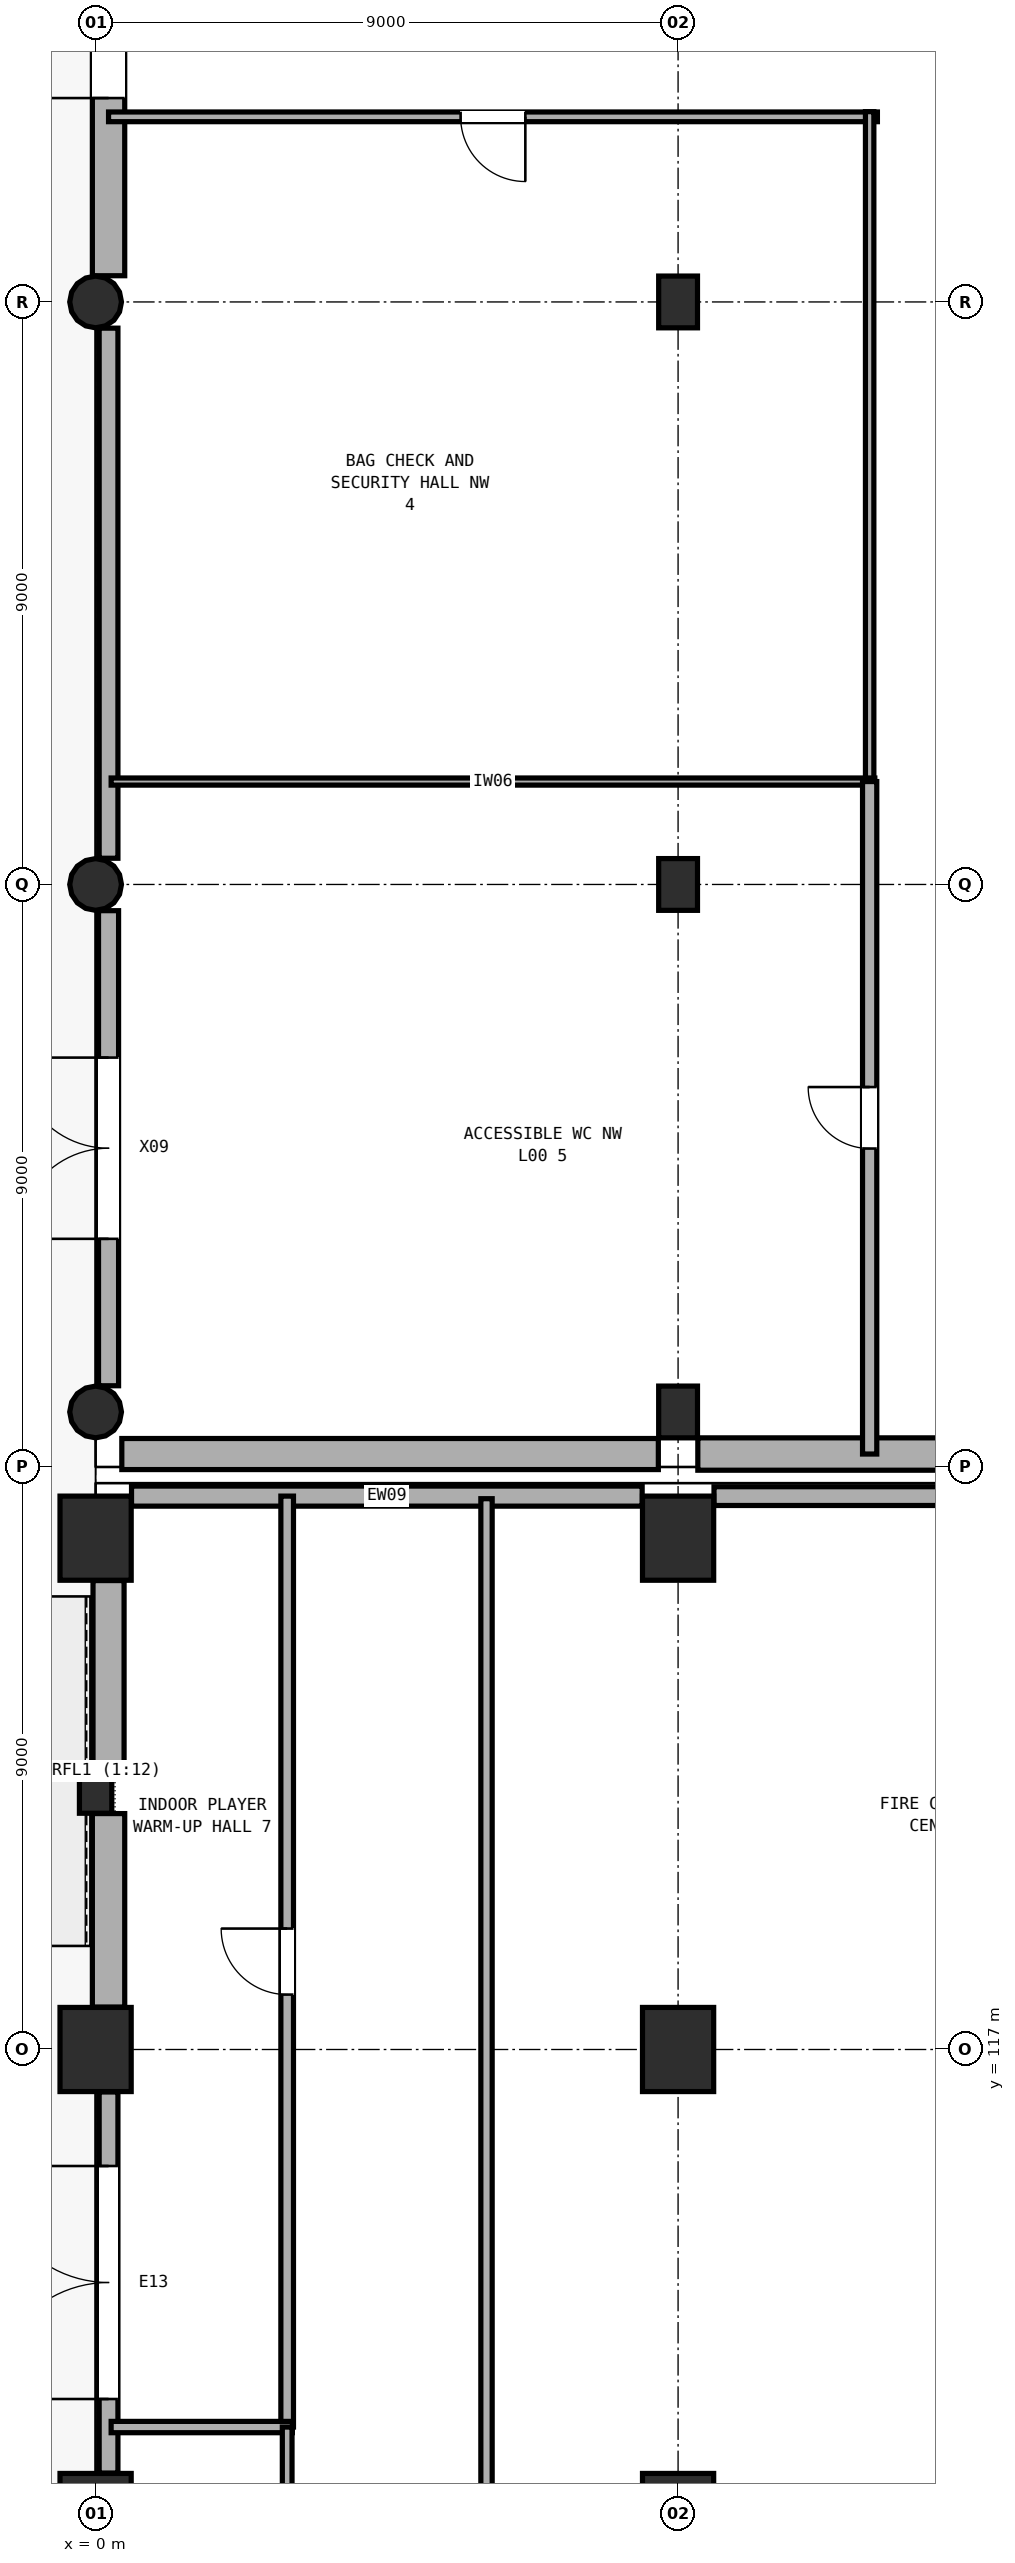
"""IFC4 building model, lengths in metres.
Left out: names, types, materials, properties, quantities, classifications, styles, units other than length and angle.
Written with IfcOpenShell. Run it as: python <this file> out.ifc"""

import sys

from ifc_helpers import new_model, si_unit, direction, frame, frame_2d, origin, origin_2d, place, context, subcontext, project, spatial, rectangle, circle, extrude, element, fill, save


model = new_model("IFC4")
c1 = context("Model", 3, precision=1e-05, world=origin(), true_north=direction((0.0, 1.0)))
c2 = subcontext(c1, "Body", "Model", "MODEL_VIEW")
j1 = project(units=[si_unit("LENGTHUNIT", "METRE"), si_unit("PLANEANGLEUNIT", "RADIAN")], contexts=[c1])
p1 = place(None, origin())
s1 = spatial("IfcSite", under=j1, at=p1, CompositionType="ELEMENT")
p2 = place(p1, origin())
s2 = spatial("IfcBuilding", under=s1, at=p2, CompositionType="ELEMENT")
p3 = place(p2, origin())
s3 = spatial("IfcBuildingStorey", under=s2, at=p3, CompositionType="ELEMENT", Elevation=0.0)
for number, where, z_axis, x_axis in (
    (1, (0.0, 109.8, 0.0), (0.0, 0.0, 1.0), (1.0, 0.0, 0.0)),
    (2, (0.0, 117.0, 0.0), (0.0, 0.0, 1.0), (1.0, 0.0, 0.0)),
    (3, (0.0, 124.9, 0.0), (0.0, 0.0, 1.0), (1.0, 0.0, 0.0)),
    (4, (9.0, 109.8, 0.0), (0.0, 0.0, 1.0), (1.0, 0.0, 0.0)),
    (5, (9.0, 117.0, 0.0), (0.0, 0.0, 1.0), (1.0, 0.0, 0.0)),
    (6, (9.0, 124.9, 0.0), (0.0, 0.0, 1.0), (1.0, 0.0, 0.0)),
):
    element("IfcColumn", number, at=place(p3, frame(where, z_axis=z_axis, x_axis=x_axis)), inside=s3, PredefinedType="COLUMN", context=c2, shape_type="SweptSolid", body=[
        extrude(rectangle(XDim=1.1, YDim=1.3, at=origin_2d()), origin(), (0.0, 0.0, 1.0), 4.8),
    ])
for number, where, z_axis, x_axis in (
    (7, (0.0, 126.85, 0.0), (0.0, 0.0, 1.0), (1.0, 0.0, 0.0)),
    (8, (0.0, 135.0, 0.0), (0.0, 0.0, 1.0), (1.0, 0.0, 0.0)),
    (9, (0.0, 144.0, 0.0), (0.0, 0.0, 1.0), (1.0, 0.0, 0.0)),
):
    element("IfcColumn", number, at=place(p3, frame(where, z_axis=z_axis, x_axis=x_axis)), inside=s3, PredefinedType="COLUMN", context=c2, shape_type="SweptSolid", body=[
        extrude(circle(Radius=0.4, at=origin_2d()), origin(), (0.0, 0.0, 1.0), 4.8),
    ])
for number, where, z_axis, x_axis in (
    (10, (9.0, 126.85, 0.0), (0.0, 0.0, 1.0), (1.0, 0.0, 0.0)),
    (11, (9.0, 135.0, 0.0), (0.0, 0.0, 1.0), (1.0, 0.0, 0.0)),
    (12, (9.0, 144.0, 0.0), (0.0, 0.0, 1.0), (1.0, 0.0, 0.0)),
):
    element("IfcColumn", number, at=place(p3, frame(where, z_axis=z_axis, x_axis=x_axis)), inside=s3, PredefinedType="COLUMN", context=c2, shape_type="SweptSolid", body=[
        extrude(rectangle(XDim=0.6, YDim=0.8, at=origin_2d()), origin(), (0.0, 0.0, 1.0), 4.8),
    ])
p4 = place(p3, frame((0.0, 121.0, 0.0), z_axis=(0.0, 0.0, 1.0), x_axis=(1.0, 0.0, 0.0)))
e13 = element("IfcColumn", 13, at=p4, inside=s3, PredefinedType="PILASTER", context=c2, shape_type="SweptSolid", body=[
    extrude(rectangle(XDim=0.5, YDim=0.7, at=origin_2d()), origin(), (0.0, 0.0, 1.0), 4.8),
])
p5 = place(p3, frame((0.2, 110.455, 0.0), z_axis=(0.0, 0.0, 1.0), x_axis=(0.0, 1.0, 0.0)))
e14 = element("IfcWall", 14, at=p5, inside=s3, PredefinedType="SOLIDWALL", context=c2, shape_type="SweptSolid", body=[
    extrude(rectangle(XDim=5.89, YDim=0.29, at=frame_2d((2.945, 0.0))), origin(), (0.0, 0.0, 1.0), 3.58),
])
p6 = place(p5, frame((1.145, 0.0, 0.0)))
e15 = element("IfcOpeningElement", 15, at=p6, cuts=e14, PredefinedType="OPENING", context=c2, shape_type="SweptSolid", body=[
    extrude(rectangle(XDim=3.6, YDim=2.6, at=frame_2d((1.8, 1.3))), frame((0.0, 0.155, 0.0), z_axis=(0.0, -1.0, 0.0), x_axis=(1.0, 0.0, 0.0)), (0.0, 0.0, 1.0), 0.31),
])
p7 = place(p3, frame((0.2, 117.655, 0.0), z_axis=(0.0, 0.0, 1.0), x_axis=(0.0, 1.0, 0.0)))
e16 = element("IfcWall", 16, at=p7, inside=s3, PredefinedType="SOLIDWALL", context=c2, shape_type="SweptSolid", body=[
    extrude(rectangle(XDim=2.99, YDim=0.5, at=frame_2d((1.495, 0.0))), origin(), (0.0, 0.0, 1.0), 3.28),
])
p8 = place(p3, frame((0.2, 121.355, 0.0), z_axis=(0.0, 0.0, 1.0), x_axis=(0.0, 1.0, 0.0)))
e17 = element("IfcWall", 17, at=p8, inside=s3, PredefinedType="SOLIDWALL", context=c2, shape_type="SweptSolid", body=[
    extrude(rectangle(XDim=2.89, YDim=0.48, at=frame_2d((1.445, 0.0))), origin(), (0.0, 0.0, 1.0), 3.28),
])
p9 = place(p3, frame((0.555, 125.55, 0.0), z_axis=(0.0, 0.0, 1.0), x_axis=(1.0, 0.0, 0.0)))
e18 = element("IfcWall", 18, at=p9, inside=s3, PredefinedType="SOLIDWALL", context=c2, shape_type="SweptSolid", body=[
    extrude(rectangle(XDim=7.89, YDim=0.31, at=frame_2d((3.945, 0.0))), origin(), (0.0, 0.0, 1.0), 3.28),
])
p10 = place(p3, frame((9.555, 125.55, 0.0), z_axis=(0.0, 0.0, 1.0), x_axis=(1.0, 0.0, 0.0)))
e19 = element("IfcWall", 19, at=p10, inside=s3, PredefinedType="SOLIDWALL", context=c2, shape_type="SweptSolid", body=[
    extrude(rectangle(XDim=7.84, YDim=0.29, at=frame_2d((3.92, 0.0))), origin(), (0.0, 0.0, 1.0), 3.28),
])
p11 = place(p3, frame((0.2, 127.255, 0.0), z_axis=(0.0, 0.0, 1.0), x_axis=(0.0, 1.0, 0.0)))
e20 = element("IfcWall", 20, at=p11, inside=s3, PredefinedType="SOLIDWALL", context=c2, shape_type="SweptSolid", body=[
    extrude(rectangle(XDim=7.34, YDim=0.31, at=frame_2d((3.67, 0.0))), origin(), (0.0, 0.0, 1.0), 3.28),
])
p12 = place(p11, frame((2.27, 0.0, 0.0)))
e21 = element("IfcOpeningElement", 21, at=p12, cuts=e20, PredefinedType="OPENING", context=c2, shape_type="SweptSolid", body=[
    extrude(rectangle(XDim=2.8, YDim=2.4, at=frame_2d((1.4, 1.2))), frame((0.0, 0.165, 0.0), z_axis=(0.0, -1.0, 0.0), x_axis=(1.0, 0.0, 0.0)), (0.0, 0.0, 1.0), 0.33),
])
p13 = place(p3, frame((0.2, 135.405, 0.0), z_axis=(0.0, 0.0, 1.0), x_axis=(0.0, 1.0, 0.0)))
e22 = element("IfcWall", 22, at=p13, inside=s3, PredefinedType="SOLIDWALL", context=c2, shape_type="SweptSolid", body=[
    extrude(rectangle(XDim=8.19, YDim=0.29, at=frame_2d((4.095, 0.0))), origin(), (0.0, 0.0, 1.0), 3.58),
])
p14 = place(p3, frame((0.2, 144.405, 0.0), z_axis=(0.0, 0.0, 1.0), x_axis=(0.0, 1.0, 0.0)))
e23 = element("IfcWall", 23, at=p14, inside=s3, PredefinedType="SOLIDWALL", context=c2, shape_type="SweptSolid", body=[
    extrude(rectangle(XDim=8.19, YDim=0.5, at=frame_2d((4.095, 0.0))), origin(), (0.0, 0.0, 1.0), 3.58),
])
p15 = place(p14, frame((2.745, 0.0, 0.0)))
e24 = element("IfcOpeningElement", 24, at=p15, cuts=e23, PredefinedType="OPENING", context=c2, shape_type="SweptSolid", body=[
    extrude(rectangle(XDim=2.7, YDim=2.4, at=frame_2d((1.35, 1.2))), frame((0.0, 0.26, 0.0), z_axis=(0.0, -1.0, 0.0), x_axis=(1.0, 0.0, 0.0)), (0.0, 0.0, 1.0), 0.52),
])
p16 = place(p3, frame((17.695, 126.2, 0.0), z_axis=(0.0, 0.0, 1.0), x_axis=(-1.0, 0.0, 0.0)))
e25 = element("IfcWall", 25, at=p16, inside=s3, PredefinedType="SOLIDWALL", context=c2, shape_type="SweptSolid", body=[
    extrude(rectangle(XDim=8.39, YDim=0.5, at=frame_2d((4.195, 0.0))), origin(), (0.0, 0.0, 1.0), 3.28),
])
p17 = place(p3, frame((8.695, 126.2, 0.0), z_axis=(0.0, 0.0, 1.0), x_axis=(-1.0, 0.0, 0.0)))
e26 = element("IfcWall", 26, at=p17, inside=s3, PredefinedType="SOLIDWALL", context=c2, shape_type="SweptSolid", body=[
    extrude(rectangle(XDim=8.29, YDim=0.48, at=frame_2d((4.145, 0.0))), origin(), (0.0, 0.0, 1.0), 3.28),
])
p18 = place(p3, frame((6.04, 102.81, 0.0), z_axis=(0.0, 0.0, 1.0), x_axis=(0.0, 1.0, 0.0)))
e27 = element("IfcWall", 27, at=p18, inside=s3, PredefinedType="PARTITIONING", context=c2, shape_type="SweptSolid", body=[
    extrude(rectangle(XDim=22.7, YDim=0.175, at=frame_2d((11.35, 0.0))), origin(), (0.0, 0.0, 1.0), 3.28),
])
p19 = place(p3, frame((2.96, 111.167, 0.0), z_axis=(0.0, 0.0, 1.0), x_axis=(0.0, 1.0, 0.0)))
e28 = element("IfcWall", 28, at=p19, inside=s3, PredefinedType="PARTITIONING", context=c2, shape_type="SweptSolid", body=[
    extrude(rectangle(XDim=14.383, YDim=0.195, at=frame_2d((7.192, 0.0))), origin(), (0.0, 0.0, 1.0), 3.28),
])
p20 = place(p19, frame((6.682, 0.0, 0.0)))
e29 = element("IfcOpeningElement", 29, at=p20, cuts=e28, PredefinedType="OPENING", context=c2, shape_type="SweptSolid", body=[
    extrude(rectangle(XDim=1.02, YDim=2.16, at=frame_2d((0.51, 1.08))), frame((0.0, 0.107, 0.0), z_axis=(0.0, -1.0, 0.0), x_axis=(1.0, 0.0, 0.0)), (0.0, 0.0, 1.0), 0.215),
])
p21 = place(p3, frame((3.04, 111.167, 0.0), z_axis=(0.0, 0.0, 1.0), x_axis=(-1.0, 0.0, 0.0)))
e30 = element("IfcWall", 30, at=p21, inside=s3, PredefinedType="PARTITIONING", context=c2, shape_type="SweptSolid", body=[
    extrude(rectangle(XDim=2.8, YDim=0.175, at=frame_2d((1.4, 0.0))), origin(), (0.0, 0.0, 1.0), 3.28),
])
p22 = place(p3, frame((2.96, 96.903, 0.0), z_axis=(0.0, 0.0, 1.0), x_axis=(0.0, 1.0, 0.0)))
e31 = element("IfcWall", 31, at=p22, inside=s3, PredefinedType="PARTITIONING", context=c2, shape_type="SweptSolid", body=[
    extrude(rectangle(XDim=14.263, YDim=0.15, at=frame_2d((7.132, 0.0))), origin(), (0.0, 0.0, 1.0), 3.28),
])
p23 = place(p22, frame((6.592, 0.0, 0.0)))
e32 = element("IfcOpeningElement", 32, at=p23, cuts=e31, PredefinedType="OPENING", context=c2, shape_type="SweptSolid", body=[
    extrude(rectangle(XDim=1.08, YDim=2.18, at=frame_2d((0.54, 1.09))), frame((0.0, 0.085, 0.0), z_axis=(0.0, -1.0, 0.0), x_axis=(1.0, 0.0, 0.0)), (0.0, 0.0, 1.0), 0.17),
])
p24 = place(p3, frame((12.08, 146.86, 0.0), z_axis=(0.0, 0.0, 1.0), x_axis=(-1.0, 0.0, 0.0)))
e33 = element("IfcWall", 33, at=p24, inside=s3, PredefinedType="PARTITIONING", context=c2, shape_type="SweptSolid", body=[
    extrude(rectangle(XDim=11.88, YDim=0.15, at=frame_2d((5.94, 0.0))), origin(), (0.0, 0.0, 1.0), 3.28),
])
p25 = place(p24, frame((5.44, 0.0, 0.0)))
e34 = element("IfcOpeningElement", 34, at=p25, cuts=e33, PredefinedType="OPENING", context=c2, shape_type="SweptSolid", body=[
    extrude(rectangle(XDim=1.0, YDim=2.1, at=frame_2d((0.5, 1.05))), frame((0.0, 0.085, 0.0), z_axis=(0.0, -1.0, 0.0), x_axis=(1.0, 0.0, 0.0)), (0.0, 0.0, 1.0), 0.17),
])
p26 = place(p3, frame((11.96, 146.94, 0.0), z_axis=(0.0, 0.0, 1.0), x_axis=(0.0, -1.0, 0.0)))
e35 = element("IfcWall", 35, at=p26, inside=s3, PredefinedType="PARTITIONING", context=c2, shape_type="SweptSolid", body=[
    extrude(rectangle(XDim=10.31, YDim=0.13, at=frame_2d((5.155, 0.0))), origin(), (0.0, 0.0, 1.0), 3.28),
])
p27 = place(p3, frame((12.04, 136.59, 0.0), z_axis=(0.0, 0.0, 1.0), x_axis=(-1.0, 0.0, 0.0)))
e36 = element("IfcWall", 36, at=p27, inside=s3, PredefinedType="PARTITIONING", context=c2, shape_type="SweptSolid", body=[
    extrude(rectangle(XDim=11.8, YDim=0.11, at=frame_2d((5.9, 0.0))), origin(), (0.0, 0.0, 1.0), 3.28),
])
p28 = place(p3, frame((11.96, 126.2, 0.0), z_axis=(0.0, 0.0, 1.0), x_axis=(0.0, 1.0, 0.0)))
e37 = element("IfcWall", 37, at=p28, inside=s3, PredefinedType="PARTITIONING", context=c2, shape_type="SweptSolid", body=[
    extrude(rectangle(XDim=10.39, YDim=0.22, at=frame_2d((5.195, 0.0))), origin(), (0.0, 0.0, 1.0), 3.28),
])
p29 = place(p28, frame((4.72, 0.0, 0.0)))
e38 = element("IfcOpeningElement", 38, at=p29, cuts=e37, PredefinedType="OPENING", context=c2, shape_type="SweptSolid", body=[
    extrude(rectangle(XDim=0.95, YDim=2.1, at=frame_2d((0.475, 1.05))), frame((0.0, 0.12, 0.0), z_axis=(0.0, -1.0, 0.0), x_axis=(1.0, 0.0, 0.0)), (0.0, 0.0, 1.0), 0.24),
])
p30 = place(p6, origin())
e39 = element("IfcDoor", 39, at=p30, inside=s3, OperationType="DOUBLE_DOOR_SINGLE_SWING", PredefinedType="DOOR", context=c2, shape_type="SweptSolid", body=[
    extrude(rectangle(XDim=3.6, YDim=2.6, at=frame_2d((1.8, 1.3))), frame((0.0, 0.025, 0.0), z_axis=(0.0, -1.0, 0.0), x_axis=(1.0, 0.0, 0.0)), (0.0, 0.0, 1.0), 0.05),
])
fill(e15, e39)
p31 = place(p12, origin())
e40 = element("IfcDoor", 40, at=p31, inside=s3, OperationType="DOUBLE_DOOR_SINGLE_SWING", PredefinedType="DOOR", context=c2, shape_type="SweptSolid", body=[
    extrude(rectangle(XDim=2.8, YDim=2.4, at=frame_2d((1.4, 1.2))), frame((0.0, 0.025, 0.0), z_axis=(0.0, -1.0, 0.0), x_axis=(1.0, 0.0, 0.0)), (0.0, 0.0, 1.0), 0.05),
])
fill(e21, e40)
p32 = place(p15, origin())
e41 = element("IfcDoor", 41, at=p32, inside=s3, OperationType="DOUBLE_DOOR_SINGLE_SWING", PredefinedType="DOOR", context=c2, shape_type="SweptSolid", body=[
    extrude(rectangle(XDim=2.7, YDim=2.4, at=frame_2d((1.35, 1.2))), frame((0.0, 0.025, 0.0), z_axis=(0.0, -1.0, 0.0), x_axis=(1.0, 0.0, 0.0)), (0.0, 0.0, 1.0), 0.05),
])
fill(e24, e41)
p33 = place(p20, origin())
e42 = element("IfcDoor", 42, at=p33, inside=s3, OperationType="SINGLE_SWING_RIGHT", PredefinedType="DOOR", context=c2, shape_type="SweptSolid", body=[
    extrude(rectangle(XDim=1.02, YDim=2.16, at=frame_2d((0.51, 1.08))), frame((0.0, 0.025, 0.0), z_axis=(0.0, -1.0, 0.0), x_axis=(1.0, 0.0, 0.0)), (0.0, 0.0, 1.0), 0.05),
])
fill(e29, e42)
p34 = place(p25, origin())
e43 = element("IfcDoor", 43, at=p34, inside=s3, OperationType="SINGLE_SWING_LEFT", PredefinedType="DOOR", context=c2, shape_type="SweptSolid", body=[
    extrude(rectangle(XDim=1.0, YDim=2.1, at=frame_2d((0.5, 1.05))), frame((0.0, 0.025, 0.0), z_axis=(0.0, -1.0, 0.0), x_axis=(1.0, 0.0, 0.0)), (0.0, 0.0, 1.0), 0.05),
])
fill(e34, e43)
p35 = place(p29, origin())
e44 = element("IfcDoor", 44, at=p35, inside=s3, OperationType="SINGLE_SWING_RIGHT", PredefinedType="DOOR", context=c2, shape_type="SweptSolid", body=[
    extrude(rectangle(XDim=0.95, YDim=2.1, at=frame_2d((0.475, 1.05))), frame((0.0, 0.025, 0.0), z_axis=(0.0, -1.0, 0.0), x_axis=(1.0, 0.0, 0.0)), (0.0, 0.0, 1.0), 0.05),
])
fill(e38, e44)
save(model, sys.argv[1])
